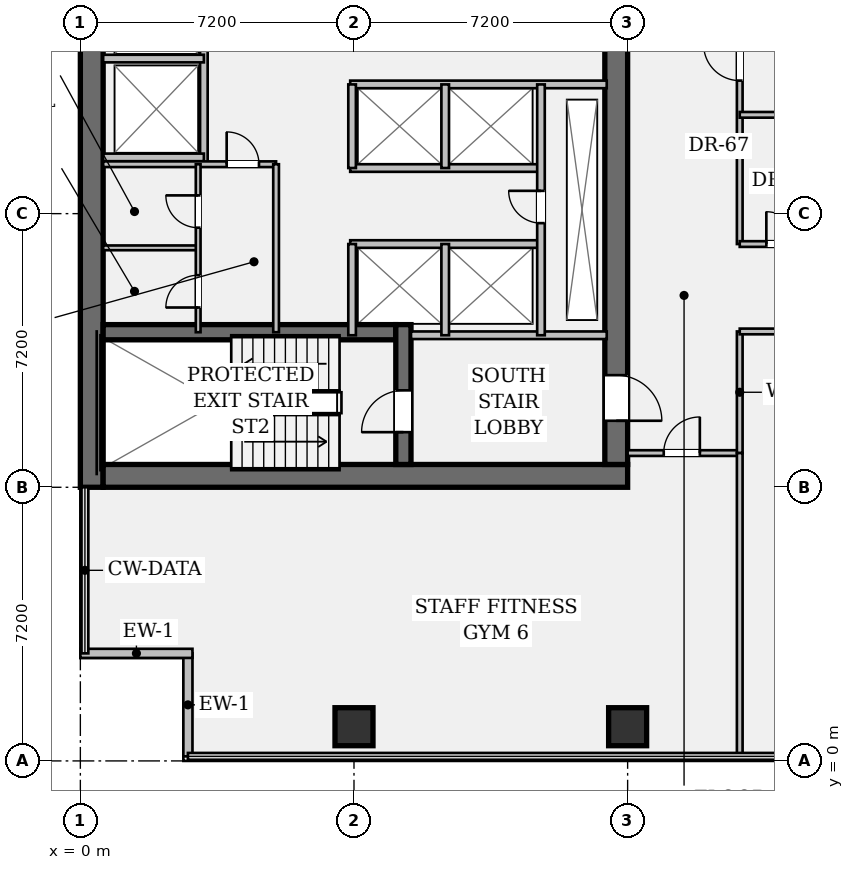
"""IFC4 building model, lengths in metres.
Left out: names, types, materials, properties, quantities, classifications, styles, units other than length and angle.
Written with IfcOpenShell. Run it as: python <this file> out.ifc"""

import sys

from ifc_helpers import new_model, si_unit, direction, frame, frame_2d, origin, origin_2d, place, context, subcontext, project, spatial, rectangle, hollow_rectangle, extrude, element, fill, save


model = new_model("IFC4")
c1 = context("Model", 3, precision=1e-05, world=origin(), true_north=direction((0.0, 1.0)))
c2 = subcontext(c1, "Body", "Model", "MODEL_VIEW")
j1 = project(units=[si_unit("LENGTHUNIT", "METRE"), si_unit("PLANEANGLEUNIT", "RADIAN")], contexts=[c1])
p1 = place(None, origin())
s1 = spatial("IfcSite", under=j1, at=p1, CompositionType="ELEMENT")
p2 = place(p1, origin())
s2 = spatial("IfcBuilding", under=s1, at=p2, CompositionType="ELEMENT")
p3 = place(p2, frame((0.0, 0.0, 61.95)))
s3 = spatial("IfcBuildingStorey", under=s2, at=p3, CompositionType="ELEMENT", Elevation=61.95)
p4 = place(p3, frame((0.3, 7.2, 0.0), z_axis=(0.0, 0.0, 1.0), x_axis=(0.0, 1.0, 0.0)))
e1 = element("IfcWall", 1, at=p4, inside=s3, PredefinedType="SHEAR", context=c2, shape_type="SweptSolid", body=[
    extrude(rectangle(XDim=28.8, YDim=0.6, at=frame_2d((14.4, 0.0))), origin(), (0.0, 0.0, 1.0), 3.57),
])
p5 = place(p3, frame((0.6, 7.5, 0.0), z_axis=(0.0, 0.0, 1.0), x_axis=(1.0, 0.0, 0.0)))
e2 = element("IfcWall", 2, at=p5, inside=s3, PredefinedType="SHEAR", context=c2, shape_type="SweptSolid", body=[
    extrude(rectangle(XDim=13.8, YDim=0.6, at=frame_2d((6.9, 0.0))), origin(), (0.0, 0.0, 1.0), 3.57),
])
p6 = place(p3, frame((14.1, 35.4, 0.0), z_axis=(0.0, 0.0, 1.0), x_axis=(0.0, -1.0, 0.0)))
e3 = element("IfcWall", 3, at=p6, inside=s3, PredefinedType="SHEAR", context=c2, shape_type="SweptSolid", body=[
    extrude(rectangle(XDim=27.6, YDim=0.6, at=frame_2d((13.8, 0.0))), origin(), (0.0, 0.0, 1.0), 3.57),
])
p7 = place(p6, frame((1.3, 0.0, 0.0)))
e4 = element("IfcOpeningElement", 4, at=p7, cuts=e3, PredefinedType="OPENING", context=c2, shape_type="SweptSolid", body=[
    extrude(rectangle(XDim=1.2, YDim=2.15, at=frame_2d((0.6, 1.075))), frame((0.0, 0.312, 0.0), z_axis=(0.0, -1.0, 0.0), x_axis=(1.0, 0.0, 0.0)), (0.0, 0.0, 1.0), 0.624),
])
p8 = place(p6, frame((25.25, 0.0, 0.0)))
e5 = element("IfcOpeningElement", 5, at=p8, cuts=e3, PredefinedType="OPENING", context=c2, shape_type="SweptSolid", body=[
    extrude(rectangle(XDim=1.2, YDim=2.15, at=frame_2d((0.6, 1.075))), frame((0.0, 0.312, 0.0), z_axis=(0.0, -1.0, 0.0), x_axis=(1.0, 0.0, 0.0)), (0.0, 0.0, 1.0), 0.624),
])
p9 = place(p6, frame((14.6, 0.0, 0.0)))
e6 = element("IfcOpeningElement", 6, at=p9, cuts=e3, PredefinedType="OPENING", context=c2, shape_type="SweptSolid", body=[
    extrude(rectangle(XDim=1.6, YDim=2.2, at=frame_2d((0.8, 1.1))), frame((0.0, 0.312, 0.0), z_axis=(0.0, -1.0, 0.0), x_axis=(1.0, 0.0, 0.0)), (0.0, 0.0, 1.0), 0.624),
])
p10 = place(p3, frame((0.6, 11.28, 0.0), z_axis=(0.0, 0.0, 1.0), x_axis=(1.0, 0.0, 0.0)))
e7 = element("IfcWall", 7, at=p10, inside=s3, PredefinedType="SHEAR", context=c2, shape_type="SweptSolid", body=[
    extrude(rectangle(XDim=7.7, YDim=0.4, at=frame_2d((3.85, 0.0))), origin(), (0.0, 0.0, 1.0), 3.57),
])
p11 = place(p3, frame((8.5, 7.8, 0.0), z_axis=(0.0, 0.0, 1.0), x_axis=(0.0, 1.0, 0.0)))
e8 = element("IfcWall", 8, at=p11, inside=s3, PredefinedType="SHEAR", context=c2, shape_type="SweptSolid", body=[
    extrude(rectangle(XDim=3.68, YDim=0.4, at=frame_2d((1.84, 0.0))), origin(), (0.0, 0.0, 1.0), 3.57),
])
p12 = place(p11, frame((0.85, 0.0, 0.0)))
e9 = element("IfcOpeningElement", 9, at=p12, cuts=e8, PredefinedType="OPENING", context=c2, shape_type="SweptSolid", body=[
    extrude(rectangle(XDim=1.1, YDim=2.15, at=frame_2d((0.55, 1.075))), frame((0.0, 0.212, 0.0), z_axis=(0.0, -1.0, 0.0), x_axis=(1.0, 0.0, 0.0)), (0.0, 0.0, 1.0), 0.424),
])
for number, where, z_axis, x_axis in (
    (10, (7.2, 0.9, 0.0), (0.0, 0.0, 1.0), (1.0, 0.0, 0.0)),
    (11, (14.4, 0.9, 0.0), (0.0, 0.0, 1.0), (1.0, 0.0, 0.0)),
):
    element("IfcColumn", number, at=place(p3, frame(where, z_axis=z_axis, x_axis=x_axis)), inside=s3, PredefinedType="COLUMN", context=c2, shape_type="SweptSolid", body=[
        extrude(hollow_rectangle(XDim=1.0, YDim=1.0, WallThickness=0.065, at=origin_2d()), origin(), (0.0, 0.0, 1.0), 3.57),
    ])
p13 = place(p3, frame((2.83, 0.12, 0.0), z_axis=(0.0, 0.0, 1.0), x_axis=(0.0, 1.0, 0.0)))
e12 = element("IfcWall", 12, at=p13, inside=s3, PredefinedType="STANDARD", context=c2, shape_type="SweptSolid", body=[
    extrude(rectangle(XDim=2.71, YDim=0.24, at=frame_2d((1.355, 0.0))), origin(), (0.0, 0.0, 1.0), 3.57),
])
p14 = place(p3, frame((2.95, 2.83, 0.0), z_axis=(0.0, 0.0, 1.0), x_axis=(-1.0, 0.0, 0.0)))
e13 = element("IfcWall", 13, at=p14, inside=s3, PredefinedType="STANDARD", context=c2, shape_type="SweptSolid", body=[
    extrude(rectangle(XDim=2.95, YDim=0.24, at=frame_2d((1.475, 0.0))), origin(), (0.0, 0.0, 1.0), 3.57),
])
p15 = place(p3, frame((8.7, 11.2, 0.0), z_axis=(0.0, 0.0, 1.0), x_axis=(1.0, 0.0, 0.0)))
e14 = element("IfcWall", 14, at=p15, inside=s3, PredefinedType="PARTITIONING", context=c2, shape_type="SweptSolid", body=[
    extrude(rectangle(XDim=5.15, YDim=0.2, at=frame_2d((2.575, 0.0))), origin(), (0.0, 0.0, 1.0), 3.57),
])
p16 = place(p3, frame((3.25, 15.7, 0.0), z_axis=(0.0, 0.0, 1.0), x_axis=(0.0, 1.0, 0.0)))
e15 = element("IfcWall", 15, at=p16, inside=s3, PredefinedType="PARTITIONING", context=c2, shape_type="SweptSolid", body=[
    extrude(rectangle(XDim=13.08, YDim=0.2, at=frame_2d((6.54, 0.0))), origin(), (0.0, 0.0, 1.0), 3.57),
])
for number, where, z_axis, x_axis in (
    (16, (0.6, 15.88, 0.0), (0.0, 0.0, 1.0), (1.0, 0.0, 0.0)),
    (17, (0.6, 18.48, 0.0), (0.0, 0.0, 1.0), (1.0, 0.0, 0.0)),
):
    element("IfcWall", number, at=place(p3, frame(where, z_axis=z_axis, x_axis=x_axis)), inside=s3, PredefinedType="PARTITIONING", context=c2, shape_type="SweptSolid", body=[
        extrude(rectangle(XDim=2.65, YDim=0.2, at=frame_2d((1.325, 0.0))), origin(), (0.0, 0.0, 1.0), 3.57),
    ])
p17 = place(p3, frame((7.1, 17.8, 0.0), z_axis=(0.0, 0.0, 1.0), x_axis=(1.0, 0.0, 0.0)))
e18 = element("IfcWall", 18, at=p17, inside=s3, PredefinedType="PARTITIONING", context=c2, shape_type="SweptSolid", body=[
    extrude(rectangle(XDim=6.75, YDim=0.2, at=frame_2d((3.375, 0.0))), origin(), (0.0, 0.0, 1.0), 3.57),
])
for number, where, z_axis, x_axis in (
    (19, (7.1, 15.6, 0.0), (0.0, 0.0, 1.0), (1.0, 0.0, 0.0)),
    (20, (7.1, 13.6, 0.0), (0.0, 0.0, 1.0), (1.0, 0.0, 0.0)),
):
    element("IfcWall", number, at=place(p3, frame(where, z_axis=z_axis, x_axis=x_axis)), inside=s3, PredefinedType="PARTITIONING", context=c2, shape_type="SweptSolid", body=[
        extrude(rectangle(XDim=5.02, YDim=0.2, at=frame_2d((2.51, 0.0))), origin(), (0.0, 0.0, 1.0), 3.57),
    ])
p18 = place(p3, frame((7.15, 15.6, 0.0), z_axis=(0.0, 0.0, 1.0), x_axis=(0.0, 1.0, 0.0)))
e21 = element("IfcWall", 21, at=p18, inside=s3, PredefinedType="PARTITIONING", context=c2, shape_type="SweptSolid", body=[
    extrude(rectangle(XDim=2.2, YDim=0.2, at=frame_2d((1.1, 0.0))), origin(), (0.0, 0.0, 1.0), 3.57),
])
p19 = place(p3, frame((7.15, 11.2, 0.0), z_axis=(0.0, 0.0, 1.0), x_axis=(0.0, 1.0, 0.0)))
e22 = element("IfcWall", 22, at=p19, inside=s3, PredefinedType="PARTITIONING", context=c2, shape_type="SweptSolid", body=[
    extrude(rectangle(XDim=2.4, YDim=0.2, at=frame_2d((1.2, 0.0))), origin(), (0.0, 0.0, 1.0), 3.57),
])
p20 = place(p3, frame((9.6, 15.6, 0.0), z_axis=(0.0, 0.0, 1.0), x_axis=(0.0, 1.0, 0.0)))
e23 = element("IfcWall", 23, at=p20, inside=s3, PredefinedType="PARTITIONING", context=c2, shape_type="SweptSolid", body=[
    extrude(rectangle(XDim=2.2, YDim=0.2, at=frame_2d((1.1, 0.0))), origin(), (0.0, 0.0, 1.0), 3.57),
])
p21 = place(p3, frame((9.6, 11.2, 0.0), z_axis=(0.0, 0.0, 1.0), x_axis=(0.0, 1.0, 0.0)))
e24 = element("IfcWall", 24, at=p21, inside=s3, PredefinedType="PARTITIONING", context=c2, shape_type="SweptSolid", body=[
    extrude(rectangle(XDim=2.4, YDim=0.2, at=frame_2d((1.2, 0.0))), origin(), (0.0, 0.0, 1.0), 3.57),
])
p22 = place(p3, frame((12.12, 11.2, 0.0), z_axis=(0.0, 0.0, 1.0), x_axis=(0.0, 1.0, 0.0)))
e25 = element("IfcWall", 25, at=p22, inside=s3, PredefinedType="PARTITIONING", context=c2, shape_type="SweptSolid", body=[
    extrude(rectangle(XDim=6.6, YDim=0.2, at=frame_2d((3.3, 0.0))), origin(), (0.0, 0.0, 1.0), 3.57),
])
p23 = place(p22, frame((2.95, 0.0, 0.0)))
e26 = element("IfcOpeningElement", 26, at=p23, cuts=e25, PredefinedType="OPENING", context=c2, shape_type="SweptSolid", body=[
    extrude(rectangle(XDim=0.85, YDim=2.15, at=frame_2d((0.425, 1.075))), frame((0.0, 0.112, 0.0), z_axis=(0.0, -1.0, 0.0), x_axis=(1.0, 0.0, 0.0)), (0.0, 0.0, 1.0), 0.224),
])
p24 = place(p3, frame((0.6, 15.7, 0.0), z_axis=(0.0, 0.0, 1.0), x_axis=(1.0, 0.0, 0.0)))
e27 = element("IfcWall", 27, at=p24, inside=s3, PredefinedType="PARTITIONING", context=c2, shape_type="SweptSolid", body=[
    extrude(rectangle(XDim=4.55, YDim=0.15, at=frame_2d((2.275, 0.0))), origin(), (0.0, 0.0, 1.0), 3.57),
])
p25 = place(p24, frame((3.25, 0.0, 0.0)))
e28 = element("IfcOpeningElement", 28, at=p25, cuts=e27, PredefinedType="OPENING", context=c2, shape_type="SweptSolid", body=[
    extrude(rectangle(XDim=0.85, YDim=2.15, at=frame_2d((0.425, 1.075))), frame((0.0, 0.087, 0.0), z_axis=(0.0, -1.0, 0.0), x_axis=(1.0, 0.0, 0.0)), (0.0, 0.0, 1.0), 0.174),
])
p26 = place(p3, frame((5.15, 11.28, 0.0), z_axis=(0.0, 0.0, 1.0), x_axis=(0.0, 1.0, 0.0)))
e29 = element("IfcWall", 29, at=p26, inside=s3, PredefinedType="PARTITIONING", context=c2, shape_type="SweptSolid", body=[
    extrude(rectangle(XDim=4.42, YDim=0.15, at=frame_2d((2.21, 0.0))), origin(), (0.0, 0.0, 1.0), 3.57),
])
p27 = place(p3, frame((0.6, 13.5, 0.0), z_axis=(0.0, 0.0, 1.0), x_axis=(1.0, 0.0, 0.0)))
e30 = element("IfcWall", 30, at=p27, inside=s3, PredefinedType="PARTITIONING", context=c2, shape_type="SweptSolid", body=[
    extrude(rectangle(XDim=2.5, YDim=0.125, at=frame_2d((1.25, 0.0))), origin(), (0.0, 0.0, 1.0), 3.57),
])
p28 = place(p3, frame((3.1, 11.28, 0.0), z_axis=(0.0, 0.0, 1.0), x_axis=(0.0, 1.0, 0.0)))
e31 = element("IfcWall", 31, at=p28, inside=s3, PredefinedType="PARTITIONING", context=c2, shape_type="SweptSolid", body=[
    extrude(rectangle(XDim=4.42, YDim=0.125, at=frame_2d((2.21, 0.0))), origin(), (0.0, 0.0, 1.0), 3.57),
])
p29 = place(p28, frame((0.65, 0.0, 0.0)))
e32 = element("IfcOpeningElement", 32, at=p29, cuts=e31, PredefinedType="OPENING", context=c2, shape_type="SweptSolid", body=[
    extrude(rectangle(XDim=0.85, YDim=2.15, at=frame_2d((0.425, 1.075))), frame((0.0, 0.074, 0.0), z_axis=(0.0, -1.0, 0.0), x_axis=(1.0, 0.0, 0.0)), (0.0, 0.0, 1.0), 0.149),
])
p30 = place(p28, frame((2.75, 0.0, 0.0)))
e33 = element("IfcOpeningElement", 33, at=p30, cuts=e31, PredefinedType="OPENING", context=c2, shape_type="SweptSolid", body=[
    extrude(rectangle(XDim=0.85, YDim=2.15, at=frame_2d((0.425, 1.075))), frame((0.0, 0.074, 0.0), z_axis=(0.0, -1.0, 0.0), x_axis=(1.0, 0.0, 0.0)), (0.0, 0.0, 1.0), 0.149),
])
p31 = place(p3, frame((14.4, 8.1, 0.0), z_axis=(0.0, 0.0, 1.0), x_axis=(1.0, 0.0, 0.0)))
e34 = element("IfcWall", 34, at=p31, inside=s3, PredefinedType="PARTITIONING", context=c2, shape_type="SweptSolid", body=[
    extrude(rectangle(XDim=2.95, YDim=0.15, at=frame_2d((1.475, 0.0))), origin(), (0.0, 0.0, 1.0), 3.088),
])
p32 = place(p31, frame((0.95, 0.0, 0.0)))
e35 = element("IfcOpeningElement", 35, at=p32, cuts=e34, PredefinedType="OPENING", context=c2, shape_type="SweptSolid", body=[
    extrude(rectangle(XDim=0.95, YDim=2.15, at=frame_2d((0.475, 1.075))), frame((0.0, 0.087, 0.0), z_axis=(0.0, -1.0, 0.0), x_axis=(1.0, 0.0, 0.0)), (0.0, 0.0, 1.0), 0.174),
])
p33 = place(p3, frame((17.35, 8.1, 0.0), z_axis=(0.0, 0.0, 1.0), x_axis=(0.0, 1.0, 0.0)))
e36 = element("IfcWall", 36, at=p33, inside=s3, PredefinedType="PARTITIONING", context=c2, shape_type="SweptSolid", body=[
    extrude(rectangle(XDim=3.2, YDim=0.15, at=frame_2d((1.6, 0.0))), origin(), (0.0, 0.0, 1.0), 3.57),
])
p34 = place(p3, frame((17.35, 13.6, 0.0), z_axis=(0.0, 0.0, 1.0), x_axis=(0.0, 1.0, 0.0)))
e37 = element("IfcWall", 37, at=p34, inside=s3, PredefinedType="PARTITIONING", context=c2, shape_type="SweptSolid", body=[
    extrude(rectangle(XDim=22.3, YDim=0.15, at=frame_2d((11.15, 0.0))), origin(), (0.0, 0.0, 1.0), 2.699),
])
p35 = place(p34, frame((4.3, 0.0, 0.0)))
e38 = element("IfcOpeningElement", 38, at=p35, cuts=e37, PredefinedType="OPENING", context=c2, shape_type="SweptSolid", body=[
    extrude(rectangle(XDim=0.95, YDim=2.15, at=frame_2d((0.475, 1.075))), frame((0.0, 0.087, 0.0), z_axis=(0.0, -1.0, 0.0), x_axis=(1.0, 0.0, 0.0)), (0.0, 0.0, 1.0), 0.174),
])
p36 = place(p34, frame((8.0, 0.0, 0.0)))
e39 = element("IfcOpeningElement", 39, at=p36, cuts=e37, PredefinedType="OPENING", context=c2, shape_type="SweptSolid", body=[
    extrude(rectangle(XDim=0.95, YDim=2.15, at=frame_2d((0.475, 1.075))), frame((0.0, 0.087, 0.0), z_axis=(0.0, -1.0, 0.0), x_axis=(1.0, 0.0, 0.0)), (0.0, 0.0, 1.0), 0.174),
])
p37 = place(p34, frame((15.6, 0.0, 0.0)))
e40 = element("IfcOpeningElement", 40, at=p37, cuts=e37, PredefinedType="OPENING", context=c2, shape_type="SweptSolid", body=[
    extrude(rectangle(XDim=0.95, YDim=2.15, at=frame_2d((0.475, 1.075))), frame((0.0, 0.087, 0.0), z_axis=(0.0, -1.0, 0.0), x_axis=(1.0, 0.0, 0.0)), (0.0, 0.0, 1.0), 0.174),
])
p38 = place(p3, frame((17.35, 11.3, 0.0), z_axis=(0.0, 0.0, 1.0), x_axis=(1.0, 0.0, 0.0)))
e41 = element("IfcWall", 41, at=p38, inside=s3, PredefinedType="PARTITIONING", context=c2, shape_type="SweptSolid", body=[
    extrude(rectangle(XDim=16.25, YDim=0.15, at=frame_2d((8.125, 0.0))), origin(), (0.0, 0.0, 1.0), 2.699),
])
p39 = place(p38, frame((3.73, 0.0, 0.0)))
e42 = element("IfcOpeningElement", 42, at=p39, cuts=e41, PredefinedType="OPENING", context=c2, shape_type="SweptSolid", body=[
    extrude(rectangle(XDim=0.95, YDim=2.15, at=frame_2d((0.475, 1.075))), frame((0.0, 0.087, 0.0), z_axis=(0.0, -1.0, 0.0), x_axis=(1.0, 0.0, 0.0)), (0.0, 0.0, 1.0), 0.174),
])
p40 = place(p38, frame((11.85, 0.0, 0.0)))
e43 = element("IfcOpeningElement", 43, at=p40, cuts=e41, PredefinedType="OPENING", context=c2, shape_type="SweptSolid", body=[
    extrude(rectangle(XDim=0.95, YDim=2.15, at=frame_2d((0.475, 1.075))), frame((0.0, 0.087, 0.0), z_axis=(0.0, -1.0, 0.0), x_axis=(1.0, 0.0, 0.0)), (0.0, 0.0, 1.0), 0.174),
])
p41 = place(p3, frame((17.35, 13.6, 0.0), z_axis=(0.0, 0.0, 1.0), x_axis=(1.0, 0.0, 0.0)))
e44 = element("IfcWall", 44, at=p41, inside=s3, PredefinedType="PARTITIONING", context=c2, shape_type="SweptSolid", body=[
    extrude(rectangle(XDim=16.25, YDim=0.15, at=frame_2d((8.125, 0.0))), origin(), (0.0, 0.0, 1.0), 2.699),
])
p42 = place(p41, frame((0.7, 0.0, 0.0)))
e45 = element("IfcOpeningElement", 45, at=p42, cuts=e44, PredefinedType="OPENING", context=c2, shape_type="SweptSolid", body=[
    extrude(rectangle(XDim=0.85, YDim=2.15, at=frame_2d((0.425, 1.075))), frame((0.0, 0.087, 0.0), z_axis=(0.0, -1.0, 0.0), x_axis=(1.0, 0.0, 0.0)), (0.0, 0.0, 1.0), 0.174),
])
p43 = place(p41, frame((4.75, 0.0, 0.0)))
e46 = element("IfcOpeningElement", 46, at=p43, cuts=e44, PredefinedType="OPENING", context=c2, shape_type="SweptSolid", body=[
    extrude(rectangle(XDim=0.85, YDim=2.15, at=frame_2d((0.425, 1.075))), frame((0.0, 0.087, 0.0), z_axis=(0.0, -1.0, 0.0), x_axis=(1.0, 0.0, 0.0)), (0.0, 0.0, 1.0), 0.174),
])
p44 = place(p41, frame((6.46, 0.0, 0.0)))
e47 = element("IfcOpeningElement", 47, at=p44, cuts=e44, PredefinedType="OPENING", context=c2, shape_type="SweptSolid", body=[
    extrude(rectangle(XDim=0.85, YDim=2.15, at=frame_2d((0.425, 1.075))), frame((0.0, 0.087, 0.0), z_axis=(0.0, -1.0, 0.0), x_axis=(1.0, 0.0, 0.0)), (0.0, 0.0, 1.0), 0.174),
])
p45 = place(p41, frame((9.34, 0.0, 0.0)))
e48 = element("IfcOpeningElement", 48, at=p45, cuts=e44, PredefinedType="OPENING", context=c2, shape_type="SweptSolid", body=[
    extrude(rectangle(XDim=0.95, YDim=2.15, at=frame_2d((0.475, 1.075))), frame((0.0, 0.087, 0.0), z_axis=(0.0, -1.0, 0.0), x_axis=(1.0, 0.0, 0.0)), (0.0, 0.0, 1.0), 0.174),
])
p46 = place(p3, frame((17.35, 17.0, 0.0), z_axis=(0.0, 0.0, 1.0), x_axis=(1.0, 0.0, 0.0)))
e49 = element("IfcWall", 49, at=p46, inside=s3, PredefinedType="PARTITIONING", context=c2, shape_type="SweptSolid", body=[
    extrude(rectangle(XDim=8.85, YDim=0.15, at=frame_2d((4.425, 0.0))), origin(), (0.0, 0.0, 1.0), 2.699),
])
p47 = place(p3, frame((17.35, 0.12, 0.0), z_axis=(0.0, 0.0, 1.0), x_axis=(0.0, 1.0, 0.0)))
e50 = element("IfcWall", 50, at=p47, inside=s3, PredefinedType="PARTITIONING", context=c2, shape_type="SweptSolid", body=[
    extrude(rectangle(XDim=7.98, YDim=0.15, at=frame_2d((3.99, 0.0))), origin(), (0.0, 0.0, 1.0), 2.699),
])
p48 = place(p12, origin())
e51 = element("IfcDoor", 51, at=p48, inside=s3, OperationType="SINGLE_SWING_LEFT", PredefinedType="DOOR", context=c2, shape_type="SweptSolid", body=[
    extrude(rectangle(XDim=1.1, YDim=2.15, at=frame_2d((0.55, 1.075))), frame((0.0, 0.025, 0.0), z_axis=(0.0, -1.0, 0.0), x_axis=(1.0, 0.0, 0.0)), (0.0, 0.0, 1.0), 0.05),
])
fill(e9, e51)
p49 = place(p8, origin())
e52 = element("IfcDoor", 52, at=p49, inside=s3, OperationType="SINGLE_SWING_RIGHT", PredefinedType="DOOR", context=c2, shape_type="SweptSolid", body=[
    extrude(rectangle(XDim=1.2, YDim=2.15, at=frame_2d((0.6, 1.075))), frame((0.0, 0.025, 0.0), z_axis=(0.0, -1.0, 0.0), x_axis=(1.0, 0.0, 0.0)), (0.0, 0.0, 1.0), 0.05),
])
fill(e5, e52)
p50 = place(p23, origin())
e53 = element("IfcDoor", 53, at=p50, inside=s3, OperationType="SINGLE_SWING_RIGHT", PredefinedType="DOOR", context=c2, shape_type="SweptSolid", body=[
    extrude(rectangle(XDim=0.85, YDim=2.15, at=frame_2d((0.425, 1.075))), frame((0.0, 0.025, 0.0), z_axis=(0.0, -1.0, 0.0), x_axis=(1.0, 0.0, 0.0)), (0.0, 0.0, 1.0), 0.05),
])
fill(e26, e53)
p51 = place(p25, origin())
e54 = element("IfcDoor", 54, at=p51, inside=s3, OperationType="SINGLE_SWING_LEFT", PredefinedType="DOOR", context=c2, shape_type="SweptSolid", body=[
    extrude(rectangle(XDim=0.85, YDim=2.15, at=frame_2d((0.425, 1.075))), frame((0.0, 0.025, 0.0), z_axis=(0.0, -1.0, 0.0), x_axis=(1.0, 0.0, 0.0)), (0.0, 0.0, 1.0), 0.05),
])
fill(e28, e54)
p52 = place(p29, origin())
e55 = element("IfcDoor", 55, at=p52, inside=s3, OperationType="SINGLE_SWING_LEFT", PredefinedType="DOOR", context=c2, shape_type="SweptSolid", body=[
    extrude(rectangle(XDim=0.85, YDim=2.15, at=frame_2d((0.425, 1.075))), frame((0.0, 0.025, 0.0), z_axis=(0.0, -1.0, 0.0), x_axis=(1.0, 0.0, 0.0)), (0.0, 0.0, 1.0), 0.05),
])
fill(e32, e55)
p53 = place(p30, origin())
e56 = element("IfcDoor", 56, at=p53, inside=s3, OperationType="SINGLE_SWING_RIGHT", PredefinedType="DOOR", context=c2, shape_type="SweptSolid", body=[
    extrude(rectangle(XDim=0.85, YDim=2.15, at=frame_2d((0.425, 1.075))), frame((0.0, 0.025, 0.0), z_axis=(0.0, -1.0, 0.0), x_axis=(1.0, 0.0, 0.0)), (0.0, 0.0, 1.0), 0.05),
])
fill(e33, e56)
p54 = place(p42, origin())
e57 = element("IfcDoor", 57, at=p54, inside=s3, OperationType="SINGLE_SWING_LEFT", PredefinedType="DOOR", context=c2, shape_type="SweptSolid", body=[
    extrude(rectangle(XDim=0.85, YDim=2.15, at=frame_2d((0.425, 1.075))), frame((0.0, 0.025, 0.0), z_axis=(0.0, -1.0, 0.0), x_axis=(1.0, 0.0, 0.0)), (0.0, 0.0, 1.0), 0.05),
])
fill(e45, e57)
p55 = place(p35, origin())
e58 = element("IfcDoor", 58, at=p55, inside=s3, OperationType="SINGLE_SWING_RIGHT", PredefinedType="DOOR", context=c2, shape_type="SweptSolid", body=[
    extrude(rectangle(XDim=0.95, YDim=2.15, at=frame_2d((0.475, 1.075))), frame((0.0, 0.025, 0.0), z_axis=(0.0, -1.0, 0.0), x_axis=(1.0, 0.0, 0.0)), (0.0, 0.0, 1.0), 0.05),
])
fill(e38, e58)
p56 = place(p32, origin())
e59 = element("IfcDoor", 59, at=p56, inside=s3, OperationType="SINGLE_SWING_RIGHT", PredefinedType="DOOR", context=c2, shape_type="SweptSolid", body=[
    extrude(rectangle(XDim=0.95, YDim=2.15, at=frame_2d((0.475, 1.075))), frame((0.0, 0.025, 0.0), z_axis=(0.0, -1.0, 0.0), x_axis=(1.0, 0.0, 0.0)), (0.0, 0.0, 1.0), 0.05),
])
fill(e35, e59)
save(model, sys.argv[1])
